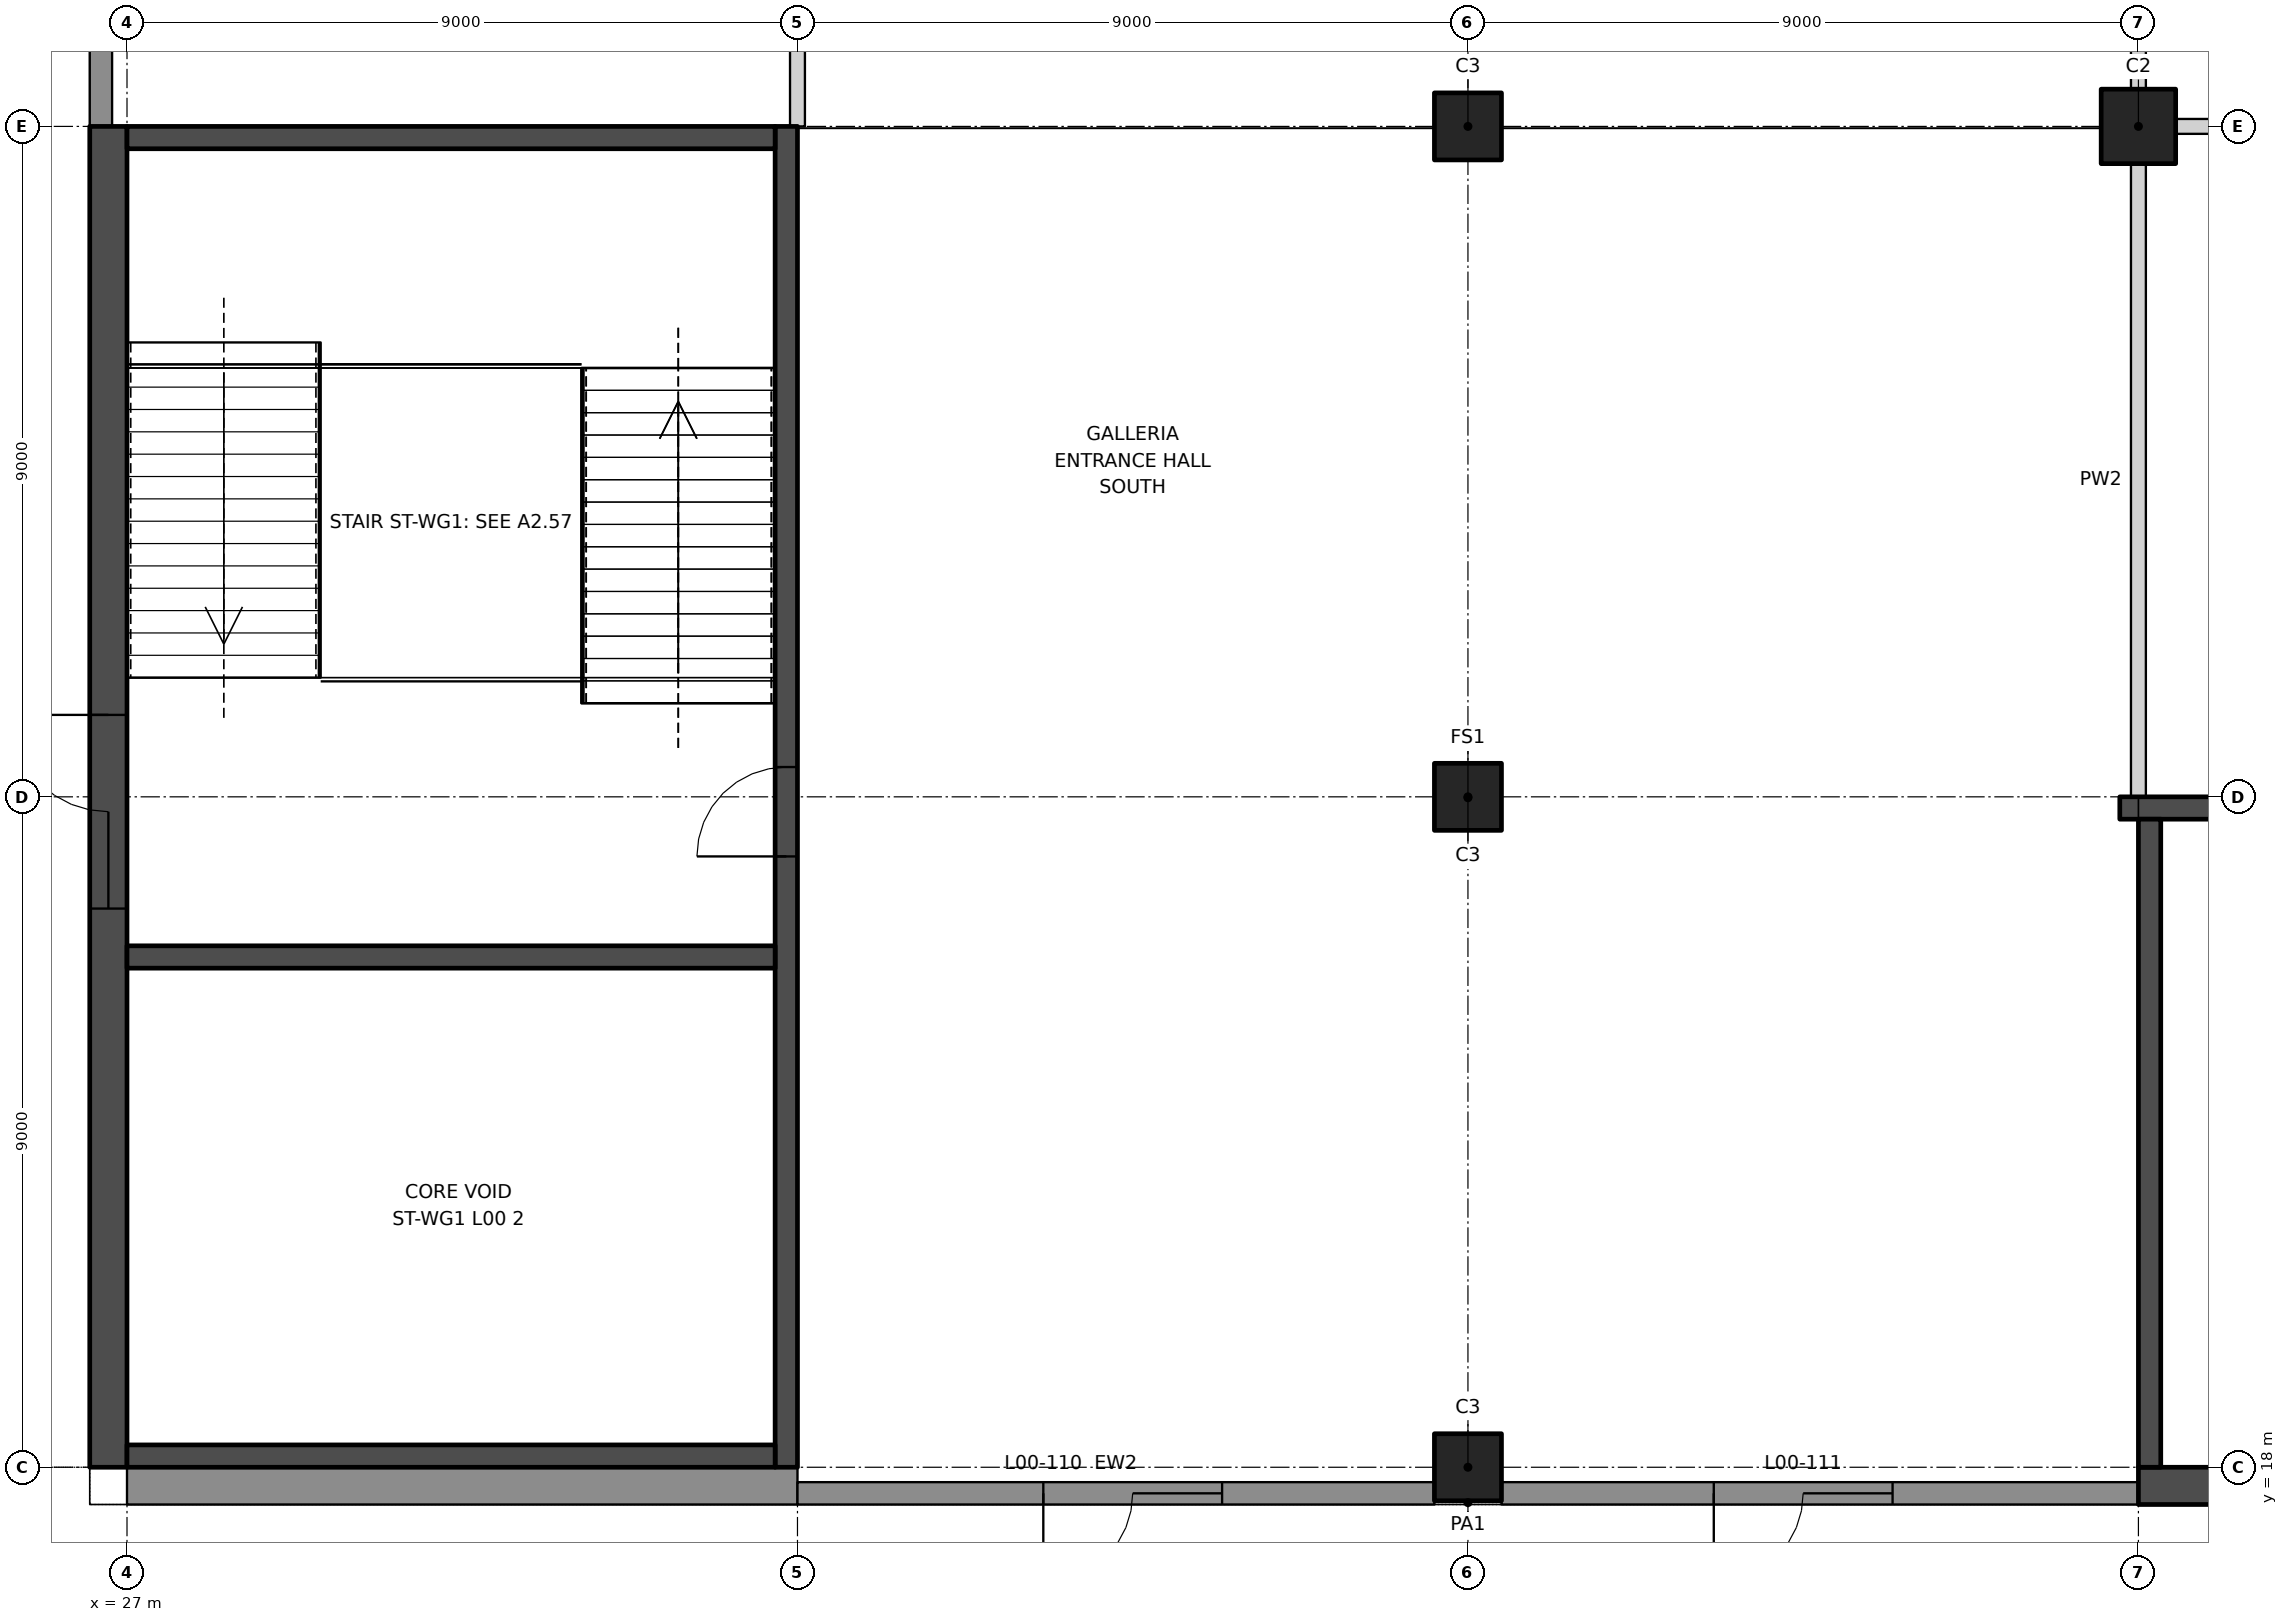
"""IFC4 building model, lengths in metres.
Left out: names, types, materials, properties, quantities, classifications, styles, units other than length and angle.
Written with IfcOpenShell. Run it as: python <this file> out.ifc"""

import sys

from ifc_helpers import new_model, si_unit, direction, frame, frame_2d, origin, origin_2d, place, context, subcontext, project, spatial, rectangle, extrude, element, fill, save


model = new_model("IFC4")
c1 = context("Model", 3, precision=1e-05, world=origin(), true_north=direction((0.0, 1.0)))
c2 = subcontext(c1, "Body", "Model", "MODEL_VIEW")
j1 = project(units=[si_unit("LENGTHUNIT", "METRE"), si_unit("PLANEANGLEUNIT", "RADIAN")], contexts=[c1])
p1 = place(None, origin())
s1 = spatial("IfcSite", under=j1, at=p1, CompositionType="ELEMENT")
p2 = place(p1, origin())
s2 = spatial("IfcBuilding", under=s1, at=p2, CompositionType="ELEMENT")
p3 = place(p2, origin())
s3 = spatial("IfcBuildingStorey", under=s2, at=p3, CompositionType="ELEMENT", Elevation=0.0)
p4 = place(p3, frame((54.0, 36.0, 0.0), z_axis=(0.0, 0.0, 1.0), x_axis=(1.0, 0.0, 0.0)))
e1 = element("IfcColumn", 1, at=p4, inside=s3, PredefinedType="COLUMN", context=c2, shape_type="SweptSolid", body=[
    extrude(rectangle(XDim=1.0, YDim=1.0, at=origin_2d()), origin(), (0.0, 0.0, 1.0), 7.0),
])
for number, where, z_axis, x_axis in (
    (2, (45.0, 18.0, 0.0), (0.0, 0.0, 1.0), (1.0, 0.0, 0.0)),
    (3, (45.0, 27.0, 0.0), (0.0, 0.0, 1.0), (1.0, 0.0, 0.0)),
    (4, (45.0, 36.0, 0.0), (0.0, 0.0, 1.0), (1.0, 0.0, 0.0)),
):
    element("IfcColumn", number, at=place(p3, frame(where, z_axis=z_axis, x_axis=x_axis)), inside=s3, PredefinedType="COLUMN", context=c2, shape_type="SweptSolid", body=[
        extrude(rectangle(XDim=0.9, YDim=0.9, at=origin_2d()), origin(), (0.0, 0.0, 1.0), 7.0),
    ])
p5 = place(p3, frame((54.5, 36.0, 0.0), z_axis=(0.0, 0.0, 1.0), x_axis=(1.0, 0.0, 0.0)))
e5 = element("IfcWall", 5, at=p5, inside=s3, PredefinedType="PARTITIONING", context=c2, shape_type="SweptSolid", body=[
    extrude(rectangle(XDim=8.05, YDim=0.2, at=frame_2d((4.025, 0.0))), origin(), (0.0, 0.0, 1.0), 5.75),
])
p6 = place(p3, frame((36.0, 36.0, 0.0), z_axis=(0.0, 0.0, 1.0), x_axis=(0.0, 1.0, 0.0)))
e6 = element("IfcWall", 6, at=p6, inside=s3, PredefinedType="PARTITIONING", context=c2, shape_type="SweptSolid", body=[
    extrude(rectangle(XDim=8.55, YDim=0.2, at=frame_2d((4.275, 0.0))), origin(), (0.0, 0.0, 1.0), 5.75),
])
p7 = place(p6, frame((3.375, 0.0, 0.0)))
e7 = element("IfcOpeningElement", 7, at=p7, cuts=e6, PredefinedType="OPENING", context=c2, shape_type="SweptSolid", body=[
    extrude(rectangle(XDim=1.8, YDim=2.1, at=frame_2d((0.9, 1.05))), frame((0.0, 0.11, 0.0), z_axis=(0.0, -1.0, 0.0), x_axis=(1.0, 0.0, 0.0)), (0.0, 0.0, 1.0), 0.22),
])
p8 = place(p3, frame((54.0, 27.0, 0.0), z_axis=(0.0, 0.0, 1.0), x_axis=(0.0, 1.0, 0.0)))
e8 = element("IfcWall", 8, at=p8, inside=s3, PredefinedType="PARTITIONING", context=c2, shape_type="SweptSolid", body=[
    extrude(rectangle(XDim=8.5, YDim=0.2, at=frame_2d((4.25, 0.0))), origin(), (0.0, 0.0, 1.0), 5.75),
])
p9 = place(p3, frame((54.0, 36.5, 0.0), z_axis=(0.0, 0.0, 1.0), x_axis=(0.0, 1.0, 0.0)))
e9 = element("IfcWall", 9, at=p9, inside=s3, PredefinedType="PARTITIONING", context=c2, shape_type="SweptSolid", body=[
    extrude(rectangle(XDim=8.0, YDim=0.2, at=frame_2d((4.0, 0.0))), origin(), (0.0, 0.0, 1.0), 5.75),
])
p10 = place(p3, frame((27.0, 17.75, 0.0), z_axis=(0.0, 0.0, 1.0), x_axis=(1.0, 0.0, 0.0)))
e10 = element("IfcWall", 10, at=p10, inside=s3, PredefinedType="SOLIDWALL", context=c2, shape_type="SweptSolid", body=[
    extrude(rectangle(XDim=9.0, YDim=0.5, at=frame_2d((4.5, 0.0))), origin(), (0.0, 0.0, 1.0), 7.0),
])
p11 = place(p3, frame((36.0, 17.65, 0.0), z_axis=(0.0, 0.0, 1.0), x_axis=(1.0, 0.0, 0.0)))
e11 = element("IfcWall", 11, at=p11, inside=s3, PredefinedType="SOLIDWALL", context=c2, shape_type="SweptSolid", body=[
    extrude(rectangle(XDim=8.55, YDim=0.3, at=frame_2d((4.275, 0.0))), origin(), (0.0, 0.0, 1.0), 7.0),
])
p12 = place(p11, frame((3.3, 0.0, 0.0)))
e12 = element("IfcOpeningElement", 12, at=p12, cuts=e11, PredefinedType="OPENING", context=c2, shape_type="SweptSolid", body=[
    extrude(rectangle(XDim=2.4, YDim=2.4, at=frame_2d((1.2, 1.2))), frame((0.0, 0.16, 0.0), z_axis=(0.0, -1.0, 0.0), x_axis=(1.0, 0.0, 0.0)), (0.0, 0.0, 1.0), 0.32),
])
p13 = place(p3, frame((45.45, 17.65, 0.0), z_axis=(0.0, 0.0, 1.0), x_axis=(1.0, 0.0, 0.0)))
e13 = element("IfcWall", 13, at=p13, inside=s3, PredefinedType="SOLIDWALL", context=c2, shape_type="SweptSolid", body=[
    extrude(rectangle(XDim=8.55, YDim=0.3, at=frame_2d((4.275, 0.0))), origin(), (0.0, 0.0, 1.0), 7.0),
])
p14 = place(p13, frame((2.85, 0.0, 0.0)))
e14 = element("IfcOpeningElement", 14, at=p14, cuts=e13, PredefinedType="OPENING", context=c2, shape_type="SweptSolid", body=[
    extrude(rectangle(XDim=2.4, YDim=2.4, at=frame_2d((1.2, 1.2))), frame((0.0, 0.16, 0.0), z_axis=(0.0, -1.0, 0.0), x_axis=(1.0, 0.0, 0.0)), (0.0, 0.0, 1.0), 0.32),
])
p15 = place(p3, frame((26.65, 44.55, 0.0), z_axis=(0.0, 0.0, 1.0), x_axis=(0.0, -1.0, 0.0)))
e15 = element("IfcWall", 15, at=p15, inside=s3, PredefinedType="SOLIDWALL", context=c2, shape_type="SweptSolid", body=[
    extrude(rectangle(XDim=8.55, YDim=0.3, at=frame_2d((4.275, 0.0))), origin(), (0.0, 0.0, 1.0), 7.0),
])
p16 = place(p15, frame((4.85, 0.0, 0.0)))
e16 = element("IfcOpeningElement", 16, at=p16, cuts=e15, PredefinedType="OPENING", context=c2, shape_type="SweptSolid", body=[
    extrude(rectangle(XDim=2.4, YDim=2.4, at=frame_2d((1.2, 1.2))), frame((0.0, 0.16, 0.0), z_axis=(0.0, -1.0, 0.0), x_axis=(1.0, 0.0, 0.0)), (0.0, 0.0, 1.0), 0.32),
])
p17 = place(p15, frame((0.85, 0.0, 0.0)))
e17 = element("IfcOpeningElement", 17, at=p17, cuts=e15, PredefinedType="OPENING", context=c2, shape_type="SweptSolid", body=[
    extrude(rectangle(XDim=2.4, YDim=2.4, at=frame_2d((1.2, 1.2))), frame((0.0, 0.16, 0.0), z_axis=(0.0, -1.0, 0.0), x_axis=(1.0, 0.0, 0.0)), (0.0, 0.0, 1.0), 0.32),
])
p18 = place(p3, frame((72.0, 26.85, 0.0), z_axis=(0.0, 0.0, 1.0), x_axis=(-1.0, 0.0, 0.0)))
e18 = element("IfcWall", 18, at=p18, inside=s3, PredefinedType="SHEAR", context=c2, shape_type="SweptSolid", body=[
    extrude(rectangle(XDim=18.25, YDim=0.3, at=frame_2d((9.125, 0.0))), origin(), (0.0, 0.0, 1.0), 7.0),
])
p19 = place(p18, frame((1.5, 0.0, 0.0)))
e19 = element("IfcOpeningElement", 19, at=p19, cuts=e18, PredefinedType="OPENING", context=c2, shape_type="SweptSolid", body=[
    extrude(rectangle(XDim=1.2, YDim=2.1, at=frame_2d((0.6, 1.05))), frame((0.0, 0.16, 0.0), z_axis=(0.0, -1.0, 0.0), x_axis=(1.0, 0.0, 0.0)), (0.0, 0.0, 1.0), 0.32),
])
p20 = place(p3, frame((72.0, 17.75, 0.0), z_axis=(0.0, 0.0, 1.0), x_axis=(-1.0, 0.0, 0.0)))
e20 = element("IfcWall", 20, at=p20, inside=s3, PredefinedType="SHEAR", context=c2, shape_type="SweptSolid", body=[
    extrude(rectangle(XDim=18.0, YDim=0.5, at=frame_2d((9.0, 0.0))), origin(), (0.0, 0.0, 1.0), 7.0),
])
p21 = place(p20, frame((0.8, 0.0, 0.0)))
e21 = element("IfcOpeningElement", 21, at=p21, cuts=e20, PredefinedType="OPENING", context=c2, shape_type="SweptSolid", body=[
    extrude(rectangle(XDim=2.6, YDim=2.4, at=frame_2d((1.3, 1.2))), frame((0.0, 0.26, 0.0), z_axis=(0.0, -1.0, 0.0), x_axis=(1.0, 0.0, 0.0)), (0.0, 0.0, 1.0), 0.52),
])
p22 = place(p3, frame((54.15, 26.7, 0.0), z_axis=(0.0, 0.0, 1.0), x_axis=(0.0, -1.0, 0.0)))
e22 = element("IfcWall", 22, at=p22, inside=s3, PredefinedType="SHEAR", context=c2, shape_type="SweptSolid", body=[
    extrude(rectangle(XDim=8.7, YDim=0.3, at=frame_2d((4.35, 0.0))), origin(), (0.0, 0.0, 1.0), 7.0),
])
p23 = place(p3, frame((35.85, 36.0, 0.0), z_axis=(0.0, 0.0, 1.0), x_axis=(0.0, -1.0, 0.0)))
e23 = element("IfcWall", 23, at=p23, inside=s3, PredefinedType="SHEAR", context=c2, shape_type="SweptSolid", body=[
    extrude(rectangle(XDim=18.0, YDim=0.3, at=frame_2d((9.0, 0.0))), origin(), (0.0, 0.0, 1.0), 7.0),
])
p24 = place(p23, frame((8.6, 0.0, 0.0)))
e24 = element("IfcOpeningElement", 24, at=p24, cuts=e23, PredefinedType="OPENING", context=c2, shape_type="SweptSolid", body=[
    extrude(rectangle(XDim=1.2, YDim=2.1, at=frame_2d((0.6, 1.05))), frame((0.0, 0.16, 0.0), z_axis=(0.0, -1.0, 0.0), x_axis=(1.0, 0.0, 0.0)), (0.0, 0.0, 1.0), 0.32),
])
p25 = place(p3, frame((26.75, 36.0, 0.0), z_axis=(0.0, 0.0, 1.0), x_axis=(0.0, -1.0, 0.0)))
e25 = element("IfcWall", 25, at=p25, inside=s3, PredefinedType="SHEAR", context=c2, shape_type="SweptSolid", body=[
    extrude(rectangle(XDim=18.0, YDim=0.5, at=frame_2d((9.0, 0.0))), origin(), (0.0, 0.0, 1.0), 7.0),
])
p26 = place(p25, frame((7.9, 0.0, 0.0)))
e26 = element("IfcOpeningElement", 26, at=p26, cuts=e25, PredefinedType="OPENING", context=c2, shape_type="SweptSolid", body=[
    extrude(rectangle(XDim=2.6, YDim=2.4, at=frame_2d((1.3, 1.2))), frame((0.0, 0.26, 0.0), z_axis=(0.0, -1.0, 0.0), x_axis=(1.0, 0.0, 0.0)), (0.0, 0.0, 1.0), 0.52),
])
for number, where, z_axis, x_axis in (
    (27, (35.7, 35.85, 0.0), (0.0, 0.0, 1.0), (-1.0, 0.0, 0.0)),
    (28, (35.7, 18.15, 0.0), (0.0, 0.0, 1.0), (-1.0, 0.0, 0.0)),
    (29, (35.7, 24.85, 0.0), (0.0, 0.0, 1.0), (-1.0, 0.0, 0.0)),
):
    element("IfcWall", number, at=place(p3, frame(where, z_axis=z_axis, x_axis=x_axis)), inside=s3, PredefinedType="SHEAR", context=c2, shape_type="SweptSolid", body=[
        extrude(rectangle(XDim=8.7, YDim=0.3, at=frame_2d((4.35, 0.0))), origin(), (0.0, 0.0, 1.0), 7.0),
    ])
p27 = place(p12, frame((2.4, 0.0, 0.0), z_axis=(0.0, 0.0, 1.0), x_axis=(-1.0, 0.0, 0.0)))
e30 = element("IfcDoor", 30, at=p27, inside=s3, OperationType="DOUBLE_DOOR_SINGLE_SWING", PredefinedType="DOOR", context=c2, shape_type="SweptSolid", body=[
    extrude(rectangle(XDim=2.4, YDim=2.4, at=frame_2d((1.2, 1.2))), frame((0.0, 0.025, 0.0), z_axis=(0.0, -1.0, 0.0), x_axis=(1.0, 0.0, 0.0)), (0.0, 0.0, 1.0), 0.05),
])
fill(e12, e30)
p28 = place(p14, frame((2.4, 0.0, 0.0), z_axis=(0.0, 0.0, 1.0), x_axis=(-1.0, 0.0, 0.0)))
e31 = element("IfcDoor", 31, at=p28, inside=s3, OperationType="DOUBLE_DOOR_SINGLE_SWING", PredefinedType="DOOR", context=c2, shape_type="SweptSolid", body=[
    extrude(rectangle(XDim=2.4, YDim=2.4, at=frame_2d((1.2, 1.2))), frame((0.0, 0.025, 0.0), z_axis=(0.0, -1.0, 0.0), x_axis=(1.0, 0.0, 0.0)), (0.0, 0.0, 1.0), 0.05),
])
fill(e14, e31)
p29 = place(p24, frame((1.2, 0.0, 0.0), z_axis=(0.0, 0.0, 1.0), x_axis=(-1.0, 0.0, 0.0)))
e32 = element("IfcDoor", 32, at=p29, inside=s3, OperationType="SINGLE_SWING_LEFT", PredefinedType="DOOR", context=c2, shape_type="SweptSolid", body=[
    extrude(rectangle(XDim=1.2, YDim=2.1, at=frame_2d((0.6, 1.05))), frame((0.0, 0.025, 0.0), z_axis=(0.0, -1.0, 0.0), x_axis=(1.0, 0.0, 0.0)), (0.0, 0.0, 1.0), 0.05),
])
fill(e24, e32)
p30 = place(p26, frame((2.6, 0.0, 0.0), z_axis=(0.0, 0.0, 1.0), x_axis=(-1.0, 0.0, 0.0)))
e33 = element("IfcDoor", 33, at=p30, inside=s3, OperationType="DOUBLE_DOOR_SINGLE_SWING", PredefinedType="DOOR", context=c2, shape_type="SweptSolid", body=[
    extrude(rectangle(XDim=2.6, YDim=2.4, at=frame_2d((1.3, 1.2))), frame((0.0, 0.025, 0.0), z_axis=(0.0, -1.0, 0.0), x_axis=(1.0, 0.0, 0.0)), (0.0, 0.0, 1.0), 0.05),
])
fill(e26, e33)
save(model, sys.argv[1])
